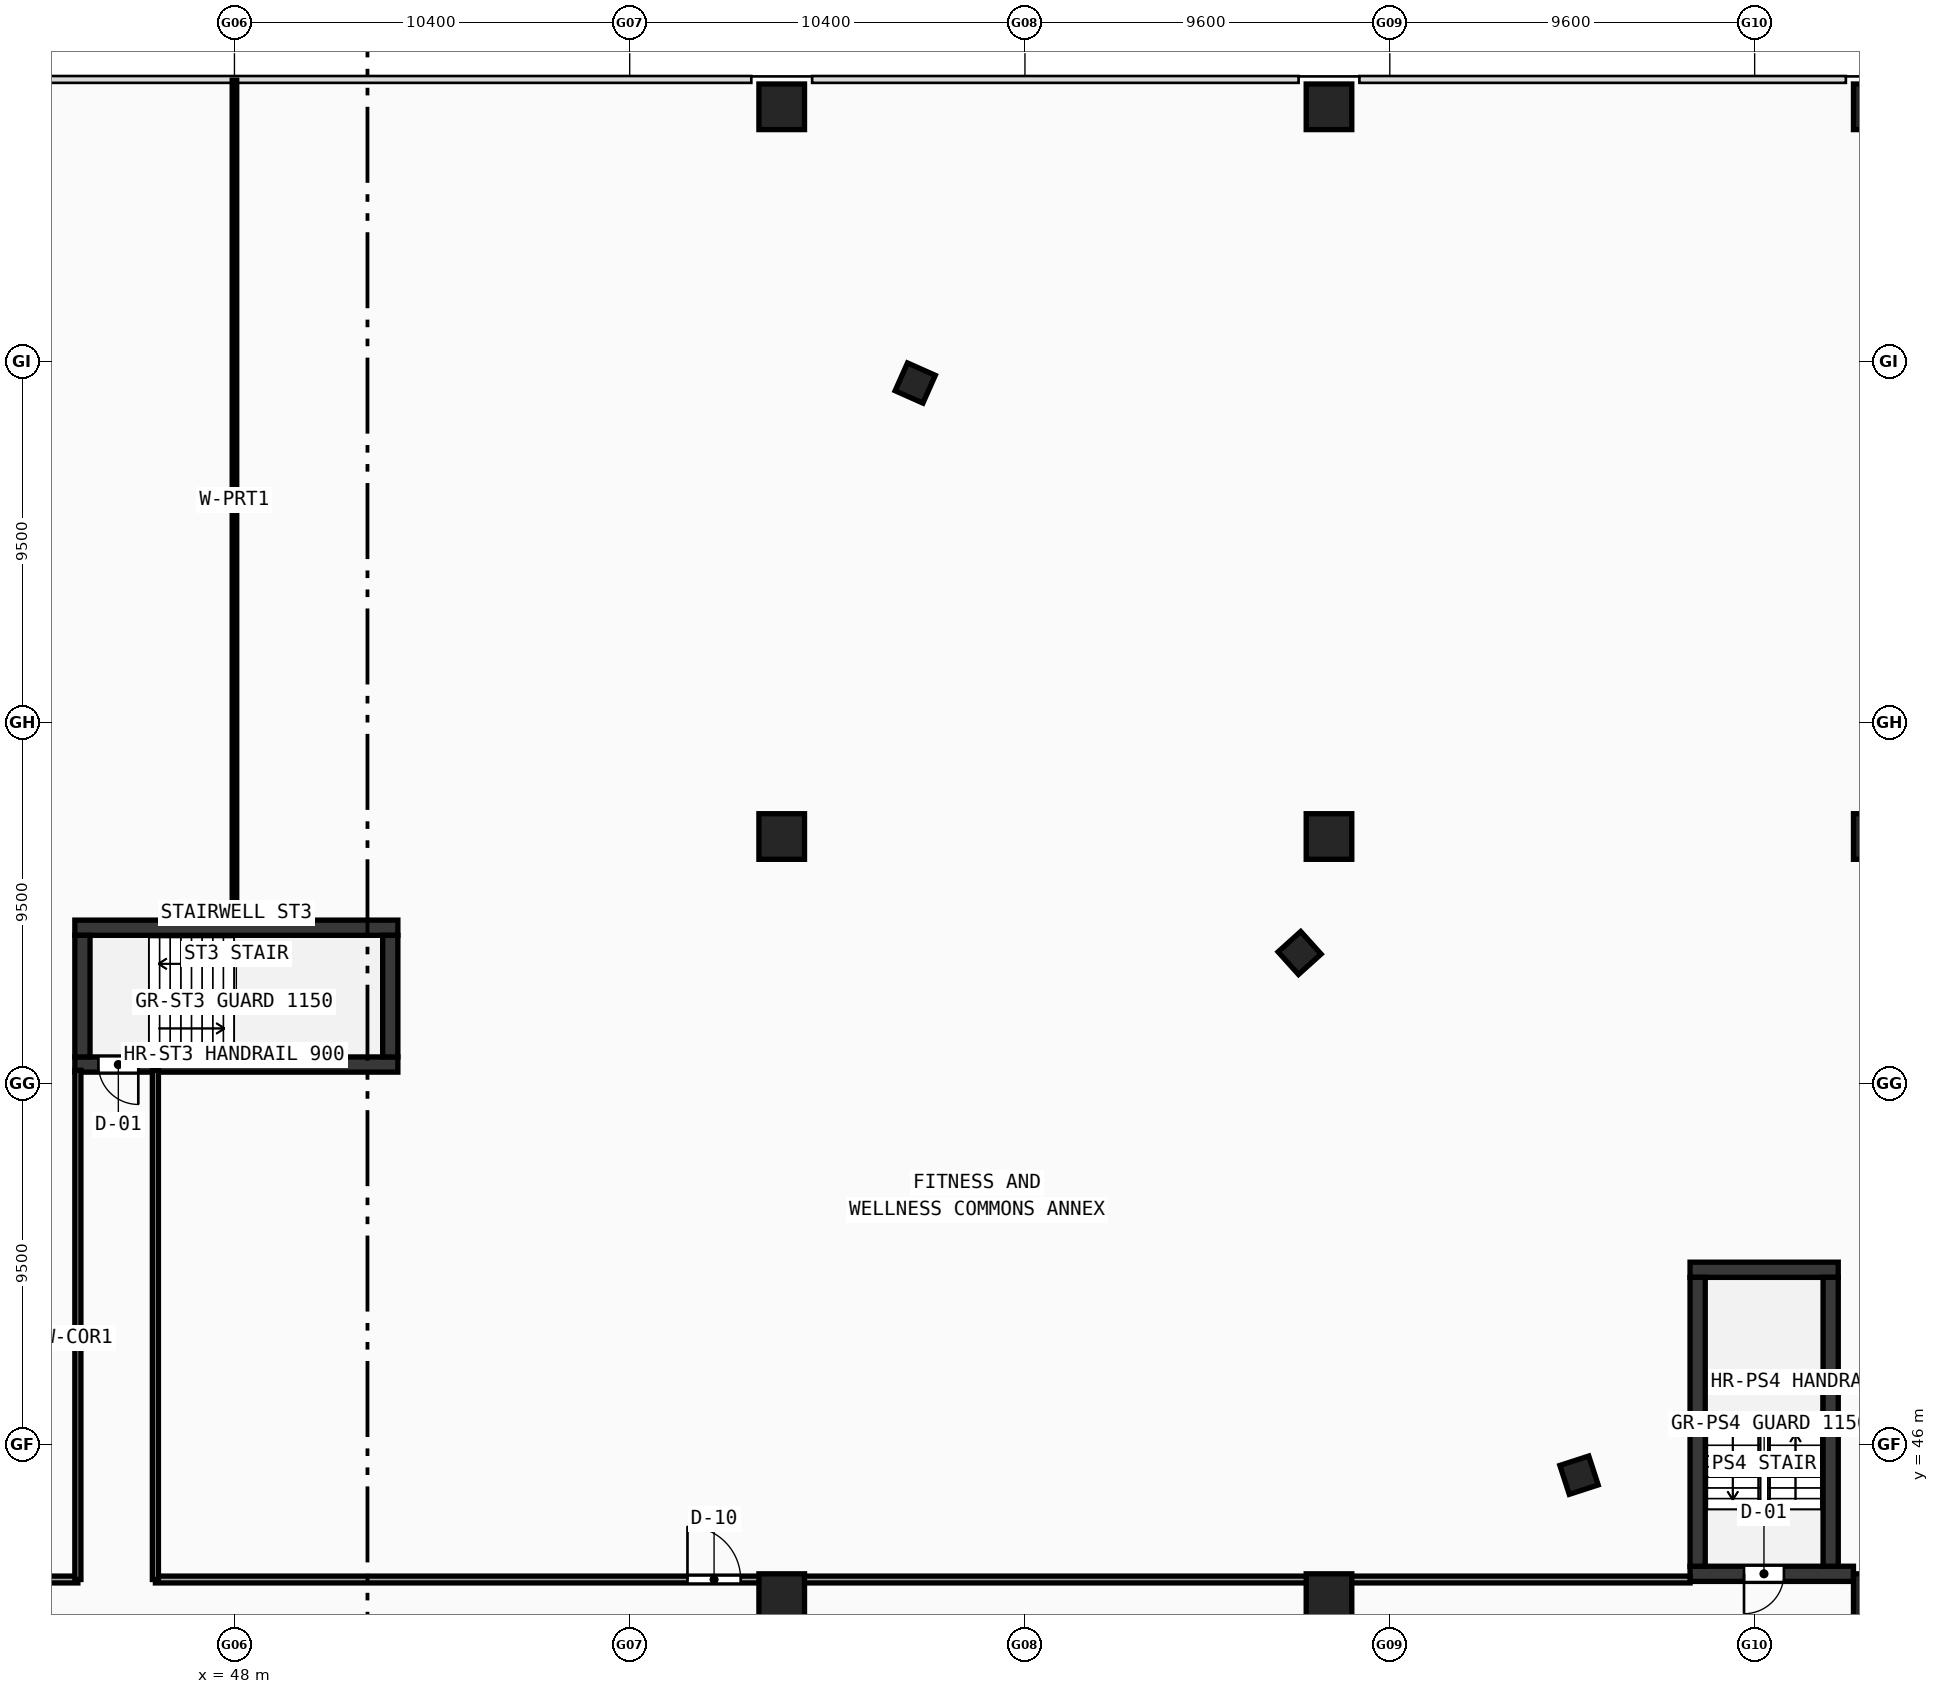
"""IFC4 building model, lengths in metres.
Left out: names, types, materials, properties, quantities, classifications, styles, units other than length and angle.
Written with IfcOpenShell. Run it as: python <this file> out.ifc"""

import sys

from ifc_helpers import new_model, si_unit, direction, frame, frame_2d, origin, origin_with_axes, origin_2d, place, context, subcontext, project, spatial, rectangle, hollow_rectangle, extrude, source, transform, mapped, element, fill, save


model = new_model("IFC4")
c1 = context("Model", 3, precision=1e-05, world=origin(), true_north=direction((0.0, 1.0)))
c2 = subcontext(c1, "Body", "Model", "MODEL_VIEW")
j1 = project(units=[si_unit("LENGTHUNIT", "METRE"), si_unit("PLANEANGLEUNIT", "RADIAN")], contexts=[c1])
p1 = place(None, origin())
s1 = spatial("IfcSite", under=j1, at=p1, CompositionType="ELEMENT")
p2 = place(p1, origin())
s2 = spatial("IfcBuilding", under=s1, at=p2, CompositionType="ELEMENT")
p3 = place(p2, frame((0.0, 0.0, 19.2)))
s3 = spatial("IfcBuildingStorey", under=s2, at=p3, CompositionType="ELEMENT", Elevation=19.2)
p4 = place(p3, frame((86.3, 50.6, 0.0), z_axis=(0.0, 0.0, 1.0), x_axis=(1.0, 0.0, 0.0)))
e1 = element("IfcWall", 1, at=p4, inside=s3, PredefinedType="SHEAR", context=c2, shape_type="SweptSolid", body=[
    extrude(rectangle(XDim=3.9, YDim=0.4, at=frame_2d((1.95, 0.0))), origin(), (0.0, 0.0, 1.0), 5.92),
])
p5 = place(p3, frame((86.3, 42.6, 0.0), z_axis=(0.0, 0.0, 1.0), x_axis=(1.0, 0.0, 0.0)))
e2 = element("IfcWall", 2, at=p5, inside=s3, PredefinedType="SHEAR", context=c2, shape_type="SweptSolid", body=[
    extrude(rectangle(XDim=4.3, YDim=0.4, at=frame_2d((2.15, 0.0))), origin(), (0.0, 0.0, 1.0), 5.92),
])
p6 = place(p5, frame((1.42, 0.0, 0.0)))
e3 = element("IfcOpeningElement", 3, at=p6, cuts=e2, PredefinedType="OPENING", context=c2, shape_type="SweptSolid", body=[
    extrude(rectangle(XDim=1.05, YDim=2.1, at=frame_2d((0.525, 1.05))), frame((0.0, 0.21, 0.0), z_axis=(0.0, -1.0, 0.0), x_axis=(1.0, 0.0, 0.0)), (0.0, 0.0, 1.0), 0.42),
])
for number, where, z_axis, x_axis in (
    (4, (86.5, 42.8, 0.0), (0.0, 0.0, 1.0), (0.0, 1.0, 0.0)),
    (5, (90.0, 42.8, 0.0), (0.0, 0.0, 1.0), (0.0, 1.0, 0.0)),
):
    element("IfcWall", number, at=place(p3, frame(where, z_axis=z_axis, x_axis=x_axis)), inside=s3, PredefinedType="SHEAR", context=c2, shape_type="SweptSolid", body=[
        extrude(rectangle(XDim=7.6, YDim=0.4, at=frame_2d((3.8, 0.0))), origin(), (0.0, 0.0, 1.0), 5.92),
    ])
p7 = place(p3, frame((43.8, 59.6, 0.0), z_axis=(0.0, 0.0, 1.0), x_axis=(1.0, 0.0, 0.0)))
e6 = element("IfcWall", 6, at=p7, inside=s3, PredefinedType="SHEAR", context=c2, shape_type="SweptSolid", body=[
    extrude(rectangle(XDim=8.5, YDim=0.4, at=frame_2d((4.25, 0.0))), origin(), (0.0, 0.0, 1.0), 5.92),
])
p8 = place(p3, frame((43.8, 56.0, 0.0), z_axis=(0.0, 0.0, 1.0), x_axis=(1.0, 0.0, 0.0)))
e7 = element("IfcWall", 7, at=p8, inside=s3, PredefinedType="SHEAR", context=c2, shape_type="SweptSolid", body=[
    extrude(rectangle(XDim=8.5, YDim=0.4, at=frame_2d((4.25, 0.0))), origin(), (0.0, 0.0, 1.0), 5.92),
])
p9 = place(p8, frame((0.62, 0.0, 0.0)))
e8 = element("IfcOpeningElement", 8, at=p9, cuts=e7, PredefinedType="OPENING", context=c2, shape_type="SweptSolid", body=[
    extrude(rectangle(XDim=1.05, YDim=2.1, at=frame_2d((0.525, 1.05))), frame((0.0, 0.21, 0.0), z_axis=(0.0, -1.0, 0.0), x_axis=(1.0, 0.0, 0.0)), (0.0, 0.0, 1.0), 0.42),
])
for number, where, z_axis, x_axis in (
    (9, (44.0, 56.2, 0.0), (0.0, 0.0, 1.0), (0.0, 1.0, 0.0)),
    (10, (52.1, 56.2, 0.0), (0.0, 0.0, 1.0), (0.0, 1.0, 0.0)),
):
    element("IfcWall", number, at=place(p3, frame(where, z_axis=z_axis, x_axis=x_axis)), inside=s3, PredefinedType="SHEAR", context=c2, shape_type="SweptSolid", body=[
        extrude(rectangle(XDim=3.2, YDim=0.4, at=frame_2d((1.6, 0.0))), origin(), (0.0, 0.0, 1.0), 5.92),
    ])
m1 = source(origin(), c2, "Body", "SweptSolid", [
    extrude(hollow_rectangle(XDim=1.2, YDim=1.2, WallThickness=0.05, at=origin_2d()), origin(), (0.0, 0.0, 1.0), 6.2),
])
for number, where, z_axis, x_axis in (
    (11, (62.4, 42.0, -0.28), (0.0, 0.0, 1.0), (1.0, 0.0, 0.0)),
    (12, (62.4, 62.0, -0.28), (0.0, 0.0, 1.0), (1.0, 0.0, 0.0)),
    (13, (62.4, 81.2, -0.28), (0.0, 0.0, 1.0), (1.0, 0.0, 0.0)),
    (14, (76.8, 42.0, -0.28), (0.0, 0.0, 1.0), (1.0, 0.0, 0.0)),
    (15, (76.8, 62.0, -0.28), (0.0, 0.0, 1.0), (1.0, 0.0, 0.0)),
    (16, (76.8, 81.2, -0.28), (0.0, 0.0, 1.0), (1.0, 0.0, 0.0)),
    (17, (91.2, 42.0, -0.28), (0.0, 0.0, 1.0), (1.0, 0.0, 0.0)),
    (18, (91.2, 62.0, -0.28), (0.0, 0.0, 1.0), (1.0, 0.0, 0.0)),
    (19, (91.2, 81.2, -0.28), (0.0, 0.0, 1.0), (1.0, 0.0, 0.0)),
):
    element("IfcColumn", number, at=place(p3, frame(where, z_axis=z_axis, x_axis=x_axis)), inside=s3, PredefinedType="COLUMN", context=c2, shape_type="MappedRepresentation", body=[
        mapped(m1, transform((0.0, 0.0, 0.0), scale=1.0)),
    ])
m2 = source(origin(), c2, "Body", "SweptSolid", [
    extrude(hollow_rectangle(XDim=0.8, YDim=0.8, WallThickness=0.032, at=origin_2d()), origin(), (0.0, 0.0, 1.0), 6.2),
])
for number, where, z_axis, x_axis in (
    (20, (83.379, 45.196, -0.28), (0.0, 0.0, 1.0), (-0.309, 0.951, 0.0)),
    (21, (76.027, 58.935, -0.28), (0.0, 0.0, 1.0), (-0.669, 0.743, 0.0)),
    (22, (65.913, 73.932, -0.28), (0.0, 0.0, 1.0), (-0.914, 0.407, 0.0)),
):
    element("IfcColumn", number, at=place(p3, frame(where, z_axis=z_axis, x_axis=x_axis)), inside=s3, PredefinedType="COLUMN", context=c2, shape_type="MappedRepresentation", body=[
        mapped(m2, transform((0.0, 0.0, 0.0), scale=1.0)),
    ])
p10 = place(p3, frame((9.7, 42.45, 0.0), z_axis=(0.0, 0.0, 1.0), x_axis=(1.0, 0.0, 0.0)))
e23 = element("IfcWall", 23, at=p10, inside=s3, PredefinedType="PARTITIONING", context=c2, shape_type="SweptSolid", body=[
    extrude(rectangle(XDim=34.18, YDim=0.18, at=frame_2d((17.09, 0.0))), origin(), (0.0, 0.0, 1.0), 2.42),
])
p11 = place(p10, frame((16.39, 0.0, 0.0)))
e24 = element("IfcOpeningElement", 24, at=p11, cuts=e23, PredefinedType="OPENING", context=c2, shape_type="SweptSolid", body=[
    extrude(rectangle(XDim=1.4, YDim=2.15, at=frame_2d((0.7, 1.075))), frame((0.0, 0.1, 0.0), z_axis=(0.0, -1.0, 0.0), x_axis=(1.0, 0.0, 0.0)), (0.0, 0.0, 1.0), 0.2),
])
p12 = place(p3, frame((45.92, 42.45, 0.0), z_axis=(0.0, 0.0, 1.0), x_axis=(1.0, 0.0, 0.0)))
e25 = element("IfcWall", 25, at=p12, inside=s3, PredefinedType="PARTITIONING", context=c2, shape_type="SweptSolid", body=[
    extrude(rectangle(XDim=40.38, YDim=0.18, at=frame_2d((20.19, 0.0))), origin(), (0.0, 0.0, 1.0), 2.42),
])
p13 = place(p12, frame((14.0, 0.0, 0.0)))
e26 = element("IfcOpeningElement", 26, at=p13, cuts=e25, PredefinedType="OPENING", context=c2, shape_type="SweptSolid", body=[
    extrude(rectangle(XDim=1.4, YDim=2.15, at=frame_2d((0.7, 1.075))), frame((0.0, 0.1, 0.0), z_axis=(0.0, -1.0, 0.0), x_axis=(1.0, 0.0, 0.0)), (0.0, 0.0, 1.0), 0.2),
])
p14 = place(p3, frame((43.88, 42.45, 0.0), z_axis=(0.0, 0.0, 1.0), x_axis=(0.0, 1.0, 0.0)))
e27 = element("IfcWall", 27, at=p14, inside=s3, PredefinedType="PARTITIONING", context=c2, shape_type="SweptSolid", body=[
    extrude(rectangle(XDim=13.4, YDim=0.16, at=frame_2d((6.7, 0.0))), origin(), (0.0, 0.0, 1.0), 2.42),
])
p15 = place(p3, frame((45.92, 42.45, 0.0), z_axis=(0.0, 0.0, 1.0), x_axis=(0.0, 1.0, 0.0)))
e28 = element("IfcWall", 28, at=p15, inside=s3, PredefinedType="PARTITIONING", context=c2, shape_type="SweptSolid", body=[
    extrude(rectangle(XDim=13.4, YDim=0.16, at=frame_2d((6.7, 0.0))), origin(), (0.0, 0.0, 1.0), 5.52),
])
p16 = place(p3, frame((48.0, 59.8, 0.0), z_axis=(0.0, 0.0, 1.0), x_axis=(0.0, 1.0, 0.0)))
e29 = element("IfcWall", 29, at=p16, inside=s3, PredefinedType="PARTITIONING", context=c2, shape_type="SweptSolid", body=[
    extrude(rectangle(XDim=22.1, YDim=0.12, at=frame_2d((11.05, 0.0))), origin(), (0.0, 0.0, 1.0), 5.12),
])
m3 = source(origin(), c2, "Body", "SweptSolid", [
    extrude(rectangle(XDim=1.05, YDim=2.1, at=frame_2d((0.525, 1.05))), frame((0.0, 0.025, 0.0), z_axis=(0.0, -1.0, 0.0), x_axis=(1.0, 0.0, 0.0)), (0.0, 0.0, 1.0), 0.05),
])
p17 = place(p6, frame((1.05, 0.0, 0.0), z_axis=(0.0, 0.0, 1.0), x_axis=(-1.0, 0.0, 0.0)))
e30 = element("IfcDoor", 30, at=p17, inside=s3, OperationType="SINGLE_SWING_RIGHT", PredefinedType="DOOR", context=c2, shape_type="MappedRepresentation", body=[
    mapped(m3, transform((0.0, 0.0, 0.0), scale=1.0)),
])
fill(e3, e30)
p18 = place(p9, frame((1.05, 0.0, 0.0), z_axis=(0.0, 0.0, 1.0), x_axis=(-1.0, 0.0, 0.0)))
e31 = element("IfcDoor", 31, at=p18, inside=s3, OperationType="SINGLE_SWING_LEFT", PredefinedType="DOOR", context=c2, shape_type="MappedRepresentation", body=[
    mapped(m3, transform((0.0, 0.0, 0.0), scale=1.0)),
])
fill(e8, e31)
m4 = source(origin(), c2, "Body", "SweptSolid", [
    extrude(rectangle(XDim=1.4, YDim=2.15, at=frame_2d((0.7, 1.075))), frame((0.0, 0.025, 0.0), z_axis=(0.0, -1.0, 0.0), x_axis=(1.0, 0.0, 0.0)), (0.0, 0.0, 1.0), 0.05),
])
p19 = place(p13, origin_with_axes())
e32 = element("IfcDoor", 32, at=p19, inside=s3, OperationType="SINGLE_SWING_LEFT", PredefinedType="DOOR", context=c2, shape_type="MappedRepresentation", body=[
    mapped(m4, transform((0.0, 0.0, 0.0), scale=1.0)),
])
fill(e26, e32)
save(model, sys.argv[1])
